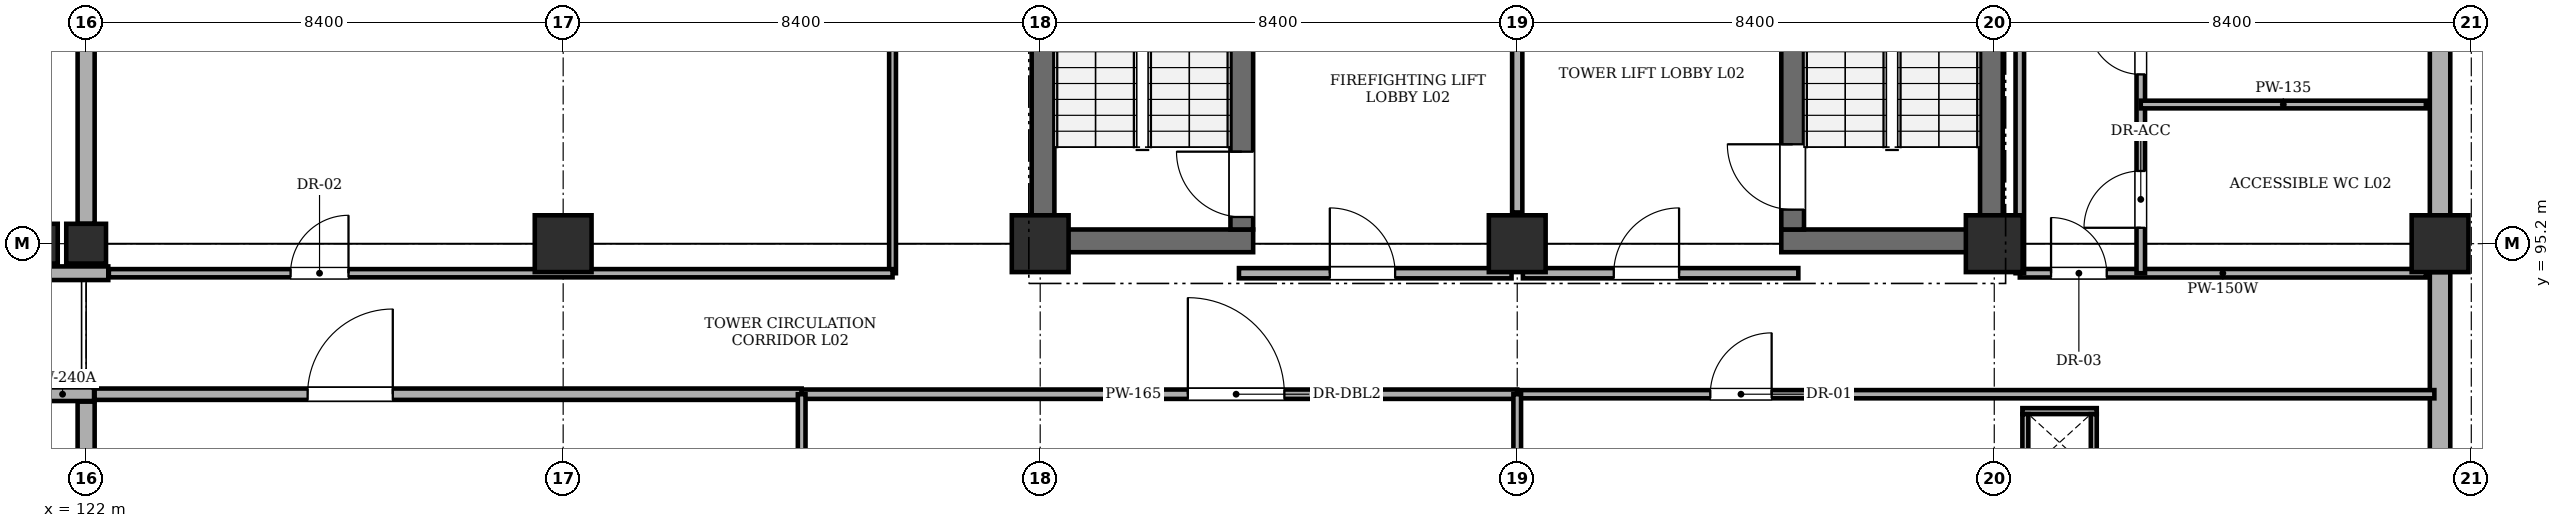
"""IFC4 building model, lengths in metres.
Left out: names, types, materials, properties, quantities, classifications, styles, units other than length and angle.
Written with IfcOpenShell. Run it as: python <this file> out.ifc"""

import sys

from ifc_helpers import new_model, si_unit, direction, frame, frame_2d, origin, origin_2d, place, context, subcontext, project, spatial, rectangle, extrude, element, fill, save


model = new_model("IFC4")
c1 = context("Model", 3, precision=1e-05, world=origin(), true_north=direction((0.0, 1.0)))
c2 = subcontext(c1, "Body", "Model", "MODEL_VIEW")
j1 = project(units=[si_unit("LENGTHUNIT", "METRE"), si_unit("PLANEANGLEUNIT", "RADIAN")], contexts=[c1])
p1 = place(None, origin())
s1 = spatial("IfcSite", under=j1, at=p1, CompositionType="ELEMENT")
p2 = place(p1, origin())
s2 = spatial("IfcBuilding", under=s1, at=p2, CompositionType="ELEMENT")
p3 = place(p2, frame((0.0, 0.0, 5.4)))
s3 = spatial("IfcBuildingStorey", under=s2, at=p3, CompositionType="ELEMENT", Elevation=5.4)
for number, where, z_axis, x_axis in (
    (1, (121.15, 95.2, 0.0), (0.0, 0.0, 1.0), (1.0, 0.0, 0.0)),
    (2, (122.0, 95.2, 0.0), (0.0, 0.0, 1.0), (1.0, 0.0, 0.0)),
):
    element("IfcColumn", number, at=place(p3, frame(where, z_axis=z_axis, x_axis=x_axis)), inside=s3, PredefinedType="COLUMN", context=c2, shape_type="SweptSolid", body=[
        extrude(rectangle(XDim=0.7, YDim=0.7, at=origin_2d()), origin(), (0.0, 0.0, 1.0), 4.58),
    ])
for number, where, z_axis, x_axis in (
    (3, (130.4, 95.2, 0.0), (0.0, 0.0, 1.0), (1.0, 0.0, 0.0)),
    (4, (138.8, 95.2, 0.0), (0.0, 0.0, 1.0), (1.0, 0.0, 0.0)),
    (5, (147.2, 95.2, 0.0), (0.0, 0.0, 1.0), (1.0, 0.0, 0.0)),
    (6, (155.6, 95.2, 0.0), (0.0, 0.0, 1.0), (1.0, 0.0, 0.0)),
    (7, (163.45, 95.2, 0.0), (0.0, 0.0, 1.0), (1.0, 0.0, 0.0)),
):
    element("IfcColumn", number, at=place(p3, frame(where, z_axis=z_axis, x_axis=x_axis)), inside=s3, PredefinedType="COLUMN", context=c2, shape_type="SweptSolid", body=[
        extrude(rectangle(XDim=1.0, YDim=1.0, at=origin_2d()), origin(), (0.0, 0.0, 1.0), 4.58),
    ])
p4 = place(p3, frame((138.65, 95.25, 0.0), z_axis=(0.0, 0.0, 1.0), x_axis=(1.0, 0.0, 0.0)))
e8 = element("IfcWall", 8, at=p4, inside=s3, PredefinedType="SHEAR", context=c2, shape_type="SweptSolid", body=[
    extrude(rectangle(XDim=3.9, YDim=0.4, at=frame_2d((1.95, 0.0))), origin(), (0.0, 0.0, 1.0), 4.58),
])
p5 = place(p3, frame((138.85, 95.45, 0.0), z_axis=(0.0, 0.0, 1.0), x_axis=(0.0, 1.0, 0.0)))
e9 = element("IfcWall", 9, at=p5, inside=s3, PredefinedType="SHEAR", context=c2, shape_type="SweptSolid", body=[
    extrude(rectangle(XDim=7.9, YDim=0.4, at=frame_2d((3.95, 0.0))), origin(), (0.0, 0.0, 1.0), 4.58),
])
p6 = place(p3, frame((142.35, 95.45, 0.0), z_axis=(0.0, 0.0, 1.0), x_axis=(0.0, 1.0, 0.0)))
e10 = element("IfcWall", 10, at=p6, inside=s3, PredefinedType="SHEAR", context=c2, shape_type="SweptSolid", body=[
    extrude(rectangle(XDim=7.9, YDim=0.4, at=frame_2d((3.95, 0.0))), origin(), (0.0, 0.0, 1.0), 4.58),
])
p7 = place(p6, frame((0.22, 0.0, 0.0)))
e11 = element("IfcOpeningElement", 11, at=p7, cuts=e10, PredefinedType="OPENING", context=c2, shape_type="SweptSolid", body=[
    extrude(rectangle(XDim=1.15, YDim=2.15, at=frame_2d((0.575, 1.075))), frame((0.0, 0.21, 0.0), z_axis=(0.0, -1.0, 0.0), x_axis=(1.0, 0.0, 0.0)), (0.0, 0.0, 1.0), 0.42),
])
p8 = place(p3, frame((151.85, 95.25, 0.0), z_axis=(0.0, 0.0, 1.0), x_axis=(1.0, 0.0, 0.0)))
e12 = element("IfcWall", 12, at=p8, inside=s3, PredefinedType="SHEAR", context=c2, shape_type="SweptSolid", body=[
    extrude(rectangle(XDim=3.9, YDim=0.4, at=frame_2d((1.95, 0.0))), origin(), (0.0, 0.0, 1.0), 4.58),
])
p9 = place(p3, frame((152.05, 95.45, 0.0), z_axis=(0.0, 0.0, 1.0), x_axis=(0.0, 1.0, 0.0)))
e13 = element("IfcWall", 13, at=p9, inside=s3, PredefinedType="SHEAR", context=c2, shape_type="SweptSolid", body=[
    extrude(rectangle(XDim=7.9, YDim=0.4, at=frame_2d((3.95, 0.0))), origin(), (0.0, 0.0, 1.0), 4.58),
])
p10 = place(p9, frame((0.35, 0.0, 0.0)))
e14 = element("IfcOpeningElement", 14, at=p10, cuts=e13, PredefinedType="OPENING", context=c2, shape_type="SweptSolid", body=[
    extrude(rectangle(XDim=1.15, YDim=2.15, at=frame_2d((0.575, 1.075))), frame((0.0, 0.21, 0.0), z_axis=(0.0, -1.0, 0.0), x_axis=(1.0, 0.0, 0.0)), (0.0, 0.0, 1.0), 0.42),
])
p11 = place(p3, frame((155.55, 95.45, 0.0), z_axis=(0.0, 0.0, 1.0), x_axis=(0.0, 1.0, 0.0)))
e15 = element("IfcWall", 15, at=p11, inside=s3, PredefinedType="SHEAR", context=c2, shape_type="SweptSolid", body=[
    extrude(rectangle(XDim=7.9, YDim=0.4, at=frame_2d((3.95, 0.0))), origin(), (0.0, 0.0, 1.0), 4.58),
])
p12 = place(p3, frame((163.45, 94.7, 0.0), z_axis=(0.0, 0.0, 1.0), x_axis=(0.0, -1.0, 0.0)))
e16 = element("IfcWall", 16, at=p12, inside=s3, PredefinedType="STANDARD", context=c2, shape_type="SweptSolid", body=[
    extrude(rectangle(XDim=7.4, YDim=0.36, at=frame_2d((3.7, 0.0))), origin(), (0.0, 0.0, 1.0), 3.83),
])
p13 = place(p12, frame((4.2, 0.0, 1.1)))
e17 = element("IfcOpeningElement", 17, at=p13, cuts=e16, PredefinedType="OPENING", context=c2, shape_type="SweptSolid", body=[
    extrude(rectangle(XDim=1.8, YDim=1.8, at=frame_2d((0.9, 0.9))), frame((0.0, 0.19, 0.0), z_axis=(0.0, -1.0, 0.0), x_axis=(1.0, 0.0, 0.0)), (0.0, 0.0, 1.0), 0.38),
])
p14 = place(p3, frame((163.45, 103.1, 0.0), z_axis=(0.0, 0.0, 1.0), x_axis=(0.0, -1.0, 0.0)))
e18 = element("IfcWall", 18, at=p14, inside=s3, PredefinedType="STANDARD", context=c2, shape_type="SweptSolid", body=[
    extrude(rectangle(XDim=7.4, YDim=0.36, at=frame_2d((3.7, 0.0))), origin(), (0.0, 0.0, 1.0), 3.83),
])
p15 = place(p14, frame((1.15, 0.0, 1.1)))
e19 = element("IfcOpeningElement", 19, at=p15, cuts=e18, PredefinedType="OPENING", context=c2, shape_type="SweptSolid", body=[
    extrude(rectangle(XDim=1.4, YDim=1.4, at=frame_2d((0.7, 0.7))), frame((0.0, 0.19, 0.0), z_axis=(0.0, -1.0, 0.0), x_axis=(1.0, 0.0, 0.0)), (0.0, 0.0, 1.0), 0.38),
])
p16 = place(p3, frame((122.0, 87.15, 0.0), z_axis=(0.0, 0.0, 1.0), x_axis=(0.0, 1.0, 0.0)))
e20 = element("IfcWall", 20, at=p16, inside=s3, PredefinedType="STANDARD", context=c2, shape_type="SweptSolid", body=[
    extrude(rectangle(XDim=5.27, YDim=0.3, at=frame_2d((2.635, 0.0))), origin(), (0.0, 0.0, 1.0), 3.83),
])
p17 = place(p3, frame((122.14, 92.55, 0.0), z_axis=(0.0, 0.0, 1.0), x_axis=(-1.0, 0.0, 0.0)))
e21 = element("IfcWall", 21, at=p17, inside=s3, PredefinedType="STANDARD", context=c2, shape_type="SweptSolid", body=[
    extrude(rectangle(XDim=1.11, YDim=0.24, at=frame_2d((0.555, 0.0))), origin(), (0.0, 0.0, 1.0), 4.58),
])
p18 = place(p3, frame((121.03, 94.68, 0.0), z_axis=(0.0, 0.0, 1.0), x_axis=(1.0, 0.0, 0.0)))
e22 = element("IfcWall", 22, at=p18, inside=s3, PredefinedType="STANDARD", context=c2, shape_type="SweptSolid", body=[
    extrude(rectangle(XDim=1.36, YDim=0.24, at=frame_2d((0.68, 0.0))), origin(), (0.0, 0.0, 1.0), 4.58),
])
p19 = place(p3, frame((122.0, 95.55, 0.0), z_axis=(0.0, 0.0, 1.0), x_axis=(0.0, 1.0, 0.0)))
e23 = element("IfcWall", 23, at=p19, inside=s3, PredefinedType="STANDARD", context=c2, shape_type="SweptSolid", body=[
    extrude(rectangle(XDim=7.7, YDim=0.3, at=frame_2d((3.85, 0.0))), origin(), (0.0, 0.0, 1.0), 3.83),
])
p20 = place(p3, frame((142.3, 94.68, 0.0), z_axis=(0.0, 0.0, 1.0), x_axis=(1.0, 0.0, 0.0)))
e24 = element("IfcWall", 24, at=p20, inside=s3, PredefinedType="STANDARD", context=c2, shape_type="SweptSolid", body=[
    extrude(rectangle(XDim=4.8, YDim=0.18, at=frame_2d((2.4, 0.0))), origin(), (0.0, 0.0, 1.0), 4.58),
])
p21 = place(p20, frame((1.6, 0.0, 0.0)))
e25 = element("IfcOpeningElement", 25, at=p21, cuts=e24, PredefinedType="OPENING", context=c2, shape_type="SweptSolid", body=[
    extrude(rectangle(XDim=1.15, YDim=2.15, at=frame_2d((0.575, 1.075))), frame((0.0, 0.1, 0.0), z_axis=(0.0, -1.0, 0.0), x_axis=(1.0, 0.0, 0.0)), (0.0, 0.0, 1.0), 0.2),
])
p22 = place(p3, frame((147.3, 94.68, 0.0), z_axis=(0.0, 0.0, 1.0), x_axis=(1.0, 0.0, 0.0)))
e26 = element("IfcWall", 26, at=p22, inside=s3, PredefinedType="STANDARD", context=c2, shape_type="SweptSolid", body=[
    extrude(rectangle(XDim=4.85, YDim=0.18, at=frame_2d((2.425, 0.0))), origin(), (0.0, 0.0, 1.0), 4.58),
])
p23 = place(p22, frame((1.6, 0.0, 0.0)))
e27 = element("IfcOpeningElement", 27, at=p23, cuts=e26, PredefinedType="OPENING", context=c2, shape_type="SweptSolid", body=[
    extrude(rectangle(XDim=1.15, YDim=2.15, at=frame_2d((0.575, 1.075))), frame((0.0, 0.1, 0.0), z_axis=(0.0, -1.0, 0.0), x_axis=(1.0, 0.0, 0.0)), (0.0, 0.0, 1.0), 0.2),
])
p24 = place(p3, frame((147.2, 95.75, 0.0), z_axis=(0.0, 0.0, 1.0), x_axis=(0.0, 1.0, 0.0)))
e28 = element("IfcWall", 28, at=p24, inside=s3, PredefinedType="STANDARD", context=c2, shape_type="SweptSolid", body=[
    extrude(rectangle(XDim=4.5, YDim=0.18, at=frame_2d((2.25, 0.0))), origin(), (0.0, 0.0, 1.0), 3.83),
])
p25 = place(p3, frame((156.05, 94.68, 0.0), z_axis=(0.0, 0.0, 1.0), x_axis=(1.0, 0.0, 0.0)))
e29 = element("IfcWall", 29, at=p25, inside=s3, PredefinedType="PARTITIONING", context=c2, shape_type="SweptSolid", body=[
    extrude(rectangle(XDim=7.15, YDim=0.15, at=frame_2d((3.575, 0.0))), origin(), (0.0, 0.0, 1.0), 4.58),
])
p26 = place(p25, frame((0.55, 0.0, 0.0)))
e30 = element("IfcOpeningElement", 30, at=p26, cuts=e29, PredefinedType="OPENING", context=c2, shape_type="SweptSolid", body=[
    extrude(rectangle(XDim=0.98, YDim=2.12, at=frame_2d((0.49, 1.06))), frame((0.0, 0.085, 0.0), z_axis=(0.0, -1.0, 0.0), x_axis=(1.0, 0.0, 0.0)), (0.0, 0.0, 1.0), 0.17),
])
p27 = place(p3, frame((158.18, 94.68, 0.0), z_axis=(0.0, 0.0, 1.0), x_axis=(0.0, 1.0, 0.0)))
e31 = element("IfcWall", 31, at=p27, inside=s3, PredefinedType="PARTITIONING", context=c2, shape_type="SweptSolid", body=[
    extrude(rectangle(XDim=8.57, YDim=0.15, at=frame_2d((4.285, 0.0))), origin(), (0.0, 0.0, 1.0), 4.58),
])
p28 = place(p27, frame((0.8, 0.0, 0.0)))
e32 = element("IfcOpeningElement", 32, at=p28, cuts=e31, PredefinedType="OPENING", context=c2, shape_type="SweptSolid", body=[
    extrude(rectangle(XDim=1.0, YDim=2.12, at=frame_2d((0.5, 1.06))), frame((0.0, 0.085, 0.0), z_axis=(0.0, -1.0, 0.0), x_axis=(1.0, 0.0, 0.0)), (0.0, 0.0, 1.0), 0.17),
])
p29 = place(p27, frame((3.5, 0.0, 0.0)))
e33 = element("IfcOpeningElement", 33, at=p29, cuts=e31, PredefinedType="OPENING", context=c2, shape_type="SweptSolid", body=[
    extrude(rectangle(XDim=0.92, YDim=2.1, at=frame_2d((0.46, 1.05))), frame((0.0, 0.085, 0.0), z_axis=(0.0, -1.0, 0.0), x_axis=(1.0, 0.0, 0.0)), (0.0, 0.0, 1.0), 0.17),
])
p30 = place(p27, frame((6.4, 0.0, 0.0)))
e34 = element("IfcOpeningElement", 34, at=p30, cuts=e31, PredefinedType="OPENING", context=c2, shape_type="SweptSolid", body=[
    extrude(rectangle(XDim=0.92, YDim=2.1, at=frame_2d((0.46, 1.05))), frame((0.0, 0.085, 0.0), z_axis=(0.0, -1.0, 0.0), x_axis=(1.0, 0.0, 0.0)), (0.0, 0.0, 1.0), 0.17),
])
p31 = place(p3, frame((158.18, 97.65, 0.0), z_axis=(0.0, 0.0, 1.0), x_axis=(1.0, 0.0, 0.0)))
e35 = element("IfcWall", 35, at=p31, inside=s3, PredefinedType="PARTITIONING", context=c2, shape_type="SweptSolid", body=[
    extrude(rectangle(XDim=5.02, YDim=0.135, at=frame_2d((2.51, 0.0))), origin(), (0.0, 0.0, 1.0), 4.58),
])
p32 = place(p3, frame((156.05, 94.68, 0.0), z_axis=(0.0, 0.0, 1.0), x_axis=(0.0, 1.0, 0.0)))
e36 = element("IfcWall", 36, at=p32, inside=s3, PredefinedType="PARTITIONING", context=c2, shape_type="SweptSolid", body=[
    extrude(rectangle(XDim=8.57, YDim=0.15, at=frame_2d((4.285, 0.0))), origin(), (0.0, 0.0, 1.0), 4.58),
])
p33 = place(p3, frame((136.2, 94.68, 0.0), z_axis=(0.0, 0.0, 1.0), x_axis=(0.0, 1.0, 0.0)))
e37 = element("IfcWall", 37, at=p33, inside=s3, PredefinedType="PARTITIONING", context=c2, shape_type="SweptSolid", body=[
    extrude(rectangle(XDim=9.07, YDim=0.12, at=frame_2d((4.535, 0.0))), origin(), (0.0, 0.0, 1.0), 4.58),
])
p34 = place(p3, frame((122.4, 94.68, 0.0), z_axis=(0.0, 0.0, 1.0), x_axis=(1.0, 0.0, 0.0)))
e38 = element("IfcWall", 38, at=p34, inside=s3, PredefinedType="PARTITIONING", context=c2, shape_type="SweptSolid", body=[
    extrude(rectangle(XDim=13.8, YDim=0.145, at=frame_2d((6.9, 0.0))), origin(), (0.0, 0.0, 1.0), 4.58),
])
p35 = place(p34, frame((3.2, 0.0, 0.0)))
e39 = element("IfcOpeningElement", 39, at=p35, cuts=e38, PredefinedType="OPENING", context=c2, shape_type="SweptSolid", body=[
    extrude(rectangle(XDim=1.02, YDim=2.15, at=frame_2d((0.51, 1.075))), frame((0.0, 0.083, 0.0), z_axis=(0.0, -1.0, 0.0), x_axis=(1.0, 0.0, 0.0)), (0.0, 0.0, 1.0), 0.165),
])
p36 = place(p3, frame((122.15, 92.55, 0.0), z_axis=(0.0, 0.0, 1.0), x_axis=(1.0, 0.0, 0.0)))
e40 = element("IfcWall", 40, at=p36, inside=s3, PredefinedType="SOLIDWALL", context=c2, shape_type="SweptSolid", body=[
    extrude(rectangle(XDim=12.45, YDim=0.2, at=frame_2d((6.225, 0.0))), origin(), (0.0, 0.0, 1.0), 4.58),
])
p37 = place(p36, frame((3.75, 0.0, 0.0)))
e41 = element("IfcOpeningElement", 41, at=p37, cuts=e40, PredefinedType="OPENING", context=c2, shape_type="SweptSolid", body=[
    extrude(rectangle(XDim=1.5, YDim=2.2, at=frame_2d((0.75, 1.1))), frame((0.0, 0.11, 0.0), z_axis=(0.0, -1.0, 0.0), x_axis=(1.0, 0.0, 0.0)), (0.0, 0.0, 1.0), 0.22),
])
p38 = place(p3, frame((134.6, 92.55, 0.0), z_axis=(0.0, 0.0, 1.0), x_axis=(1.0, 0.0, 0.0)))
e42 = element("IfcWall", 42, at=p38, inside=s3, PredefinedType="PARTITIONING", context=c2, shape_type="SweptSolid", body=[
    extrude(rectangle(XDim=12.6, YDim=0.165, at=frame_2d((6.3, 0.0))), origin(), (0.0, 0.0, 1.0), 4.58),
])
p39 = place(p38, frame((6.8, 0.0, 0.0)))
e43 = element("IfcOpeningElement", 43, at=p39, cuts=e42, PredefinedType="OPENING", context=c2, shape_type="SweptSolid", body=[
    extrude(rectangle(XDim=1.7, YDim=2.2, at=frame_2d((0.85, 1.1))), frame((0.0, 0.093, 0.0), z_axis=(0.0, -1.0, 0.0), x_axis=(1.0, 0.0, 0.0)), (0.0, 0.0, 1.0), 0.185),
])
p40 = place(p3, frame((134.6, 78.55, 0.0), z_axis=(0.0, 0.0, 1.0), x_axis=(0.0, 1.0, 0.0)))
e44 = element("IfcWall", 44, at=p40, inside=s3, PredefinedType="PARTITIONING", context=c2, shape_type="SweptSolid", body=[
    extrude(rectangle(XDim=14.0, YDim=0.135, at=frame_2d((7.0, 0.0))), origin(), (0.0, 0.0, 1.0), 4.03),
])
p41 = place(p3, frame((147.2, 92.55, 0.0), z_axis=(0.0, 0.0, 1.0), x_axis=(1.0, 0.0, 0.0)))
e45 = element("IfcWall", 45, at=p41, inside=s3, PredefinedType="PARTITIONING", context=c2, shape_type="SweptSolid", body=[
    extrude(rectangle(XDim=16.15, YDim=0.145, at=frame_2d((8.075, 0.0))), origin(), (0.0, 0.0, 1.0), 4.58),
])
p42 = place(p41, frame((3.4, 0.0, 0.0)))
e46 = element("IfcOpeningElement", 46, at=p42, cuts=e45, PredefinedType="OPENING", context=c2, shape_type="SweptSolid", body=[
    extrude(rectangle(XDim=1.08, YDim=2.15, at=frame_2d((0.54, 1.075))), frame((0.0, 0.083, 0.0), z_axis=(0.0, -1.0, 0.0), x_axis=(1.0, 0.0, 0.0)), (0.0, 0.0, 1.0), 0.165),
])
p43 = place(p3, frame((147.2, 78.55, 0.0), z_axis=(0.0, 0.0, 1.0), x_axis=(0.0, 1.0, 0.0)))
e47 = element("IfcWall", 47, at=p43, inside=s3, PredefinedType="PARTITIONING", context=c2, shape_type="SweptSolid", body=[
    extrude(rectangle(XDim=14.0, YDim=0.135, at=frame_2d((7.0, 0.0))), origin(), (0.0, 0.0, 1.0), 3.83),
])
p44 = place(p3, frame((156.095, 92.252, 0.0), z_axis=(0.0, 0.0, 1.0), x_axis=(1.0, 0.0, 0.0)))
e48 = element("IfcWall", 48, at=p44, inside=s3, PredefinedType="PARTITIONING", context=c2, shape_type="SweptSolid", body=[
    extrude(rectangle(XDim=1.31, YDim=0.105, at=frame_2d((0.655, 0.0))), origin(), (0.0, 0.0, 1.0), 4.58),
])
for number, where, z_axis, x_axis in (
    (49, (156.147, 91.2, 0.0), (0.0, 0.0, 1.0), (0.0, 1.0, 0.0)),
    (50, (157.353, 91.2, 0.0), (0.0, 0.0, 1.0), (0.0, 1.0, 0.0)),
):
    element("IfcWall", number, at=place(p3, frame(where, z_axis=z_axis, x_axis=x_axis)), inside=s3, PredefinedType="PARTITIONING", context=c2, shape_type="SweptSolid", body=[
        extrude(rectangle(XDim=1.0, YDim=0.105, at=frame_2d((0.5, 0.0))), origin(), (0.0, 0.0, 1.0), 4.58),
    ])
p45 = place(p21, origin())
e51 = element("IfcDoor", 51, at=p45, inside=s3, OperationType="SINGLE_SWING_LEFT", PredefinedType="DOOR", context=c2, shape_type="SweptSolid", body=[
    extrude(rectangle(XDim=1.15, YDim=2.15, at=frame_2d((0.575, 1.075))), frame((0.0, 0.025, 0.0), z_axis=(0.0, -1.0, 0.0), x_axis=(1.0, 0.0, 0.0)), (0.0, 0.0, 1.0), 0.05),
])
fill(e25, e51)
p46 = place(p23, origin())
e52 = element("IfcDoor", 52, at=p46, inside=s3, OperationType="SINGLE_SWING_RIGHT", PredefinedType="DOOR", context=c2, shape_type="SweptSolid", body=[
    extrude(rectangle(XDim=1.15, YDim=2.15, at=frame_2d((0.575, 1.075))), frame((0.0, 0.025, 0.0), z_axis=(0.0, -1.0, 0.0), x_axis=(1.0, 0.0, 0.0)), (0.0, 0.0, 1.0), 0.05),
])
fill(e27, e52)
p47 = place(p26, origin())
e53 = element("IfcDoor", 53, at=p47, inside=s3, OperationType="SINGLE_SWING_LEFT", PredefinedType="DOOR", context=c2, shape_type="SweptSolid", body=[
    extrude(rectangle(XDim=0.98, YDim=2.12, at=frame_2d((0.49, 1.06))), frame((0.0, 0.025, 0.0), z_axis=(0.0, -1.0, 0.0), x_axis=(1.0, 0.0, 0.0)), (0.0, 0.0, 1.0), 0.05),
])
fill(e30, e53)
p48 = place(p28, origin())
e54 = element("IfcDoor", 54, at=p48, inside=s3, OperationType="SINGLE_SWING_LEFT", PredefinedType="DOOR", context=c2, shape_type="SweptSolid", body=[
    extrude(rectangle(XDim=1.0, YDim=2.12, at=frame_2d((0.5, 1.06))), frame((0.0, 0.025, 0.0), z_axis=(0.0, -1.0, 0.0), x_axis=(1.0, 0.0, 0.0)), (0.0, 0.0, 1.0), 0.05),
])
fill(e32, e54)
p49 = place(p29, origin())
e55 = element("IfcDoor", 55, at=p49, inside=s3, OperationType="SINGLE_SWING_RIGHT", PredefinedType="DOOR", context=c2, shape_type="SweptSolid", body=[
    extrude(rectangle(XDim=0.92, YDim=2.1, at=frame_2d((0.46, 1.05))), frame((0.0, 0.025, 0.0), z_axis=(0.0, -1.0, 0.0), x_axis=(1.0, 0.0, 0.0)), (0.0, 0.0, 1.0), 0.05),
])
fill(e33, e55)
p50 = place(p35, origin())
e56 = element("IfcDoor", 56, at=p50, inside=s3, OperationType="SINGLE_SWING_RIGHT", PredefinedType="DOOR", context=c2, shape_type="SweptSolid", body=[
    extrude(rectangle(XDim=1.02, YDim=2.15, at=frame_2d((0.51, 1.075))), frame((0.0, 0.025, 0.0), z_axis=(0.0, -1.0, 0.0), x_axis=(1.0, 0.0, 0.0)), (0.0, 0.0, 1.0), 0.05),
])
fill(e39, e56)
p51 = place(p37, origin())
e57 = element("IfcDoor", 57, at=p51, inside=s3, OperationType="SINGLE_SWING_RIGHT", PredefinedType="DOOR", context=c2, shape_type="SweptSolid", body=[
    extrude(rectangle(XDim=1.5, YDim=2.2, at=frame_2d((0.75, 1.1))), frame((0.0, 0.025, 0.0), z_axis=(0.0, -1.0, 0.0), x_axis=(1.0, 0.0, 0.0)), (0.0, 0.0, 1.0), 0.05),
])
fill(e41, e57)
p52 = place(p39, origin())
e58 = element("IfcDoor", 58, at=p52, inside=s3, OperationType="SINGLE_SWING_LEFT", PredefinedType="DOOR", context=c2, shape_type="SweptSolid", body=[
    extrude(rectangle(XDim=1.7, YDim=2.2, at=frame_2d((0.85, 1.1))), frame((0.0, 0.025, 0.0), z_axis=(0.0, -1.0, 0.0), x_axis=(1.0, 0.0, 0.0)), (0.0, 0.0, 1.0), 0.05),
])
fill(e43, e58)
p53 = place(p42, origin())
e59 = element("IfcDoor", 59, at=p53, inside=s3, OperationType="SINGLE_SWING_RIGHT", PredefinedType="DOOR", context=c2, shape_type="SweptSolid", body=[
    extrude(rectangle(XDim=1.08, YDim=2.15, at=frame_2d((0.54, 1.075))), frame((0.0, 0.025, 0.0), z_axis=(0.0, -1.0, 0.0), x_axis=(1.0, 0.0, 0.0)), (0.0, 0.0, 1.0), 0.05),
])
fill(e46, e59)
p54 = place(p7, origin())
e60 = element("IfcDoor", 60, at=p54, inside=s3, OperationType="SINGLE_SWING_RIGHT", PredefinedType="DOOR", context=c2, shape_type="SweptSolid", body=[
    extrude(rectangle(XDim=1.15, YDim=2.15, at=frame_2d((0.575, 1.075))), frame((0.0, 0.025, 0.0), z_axis=(0.0, -1.0, 0.0), x_axis=(1.0, 0.0, 0.0)), (0.0, 0.0, 1.0), 0.05),
])
fill(e11, e60)
p55 = place(p10, origin())
e61 = element("IfcDoor", 61, at=p55, inside=s3, OperationType="SINGLE_SWING_RIGHT", PredefinedType="DOOR", context=c2, shape_type="SweptSolid", body=[
    extrude(rectangle(XDim=1.15, YDim=2.15, at=frame_2d((0.575, 1.075))), frame((0.0, 0.025, 0.0), z_axis=(0.0, -1.0, 0.0), x_axis=(1.0, 0.0, 0.0)), (0.0, 0.0, 1.0), 0.05),
])
fill(e14, e61)
save(model, sys.argv[1])
